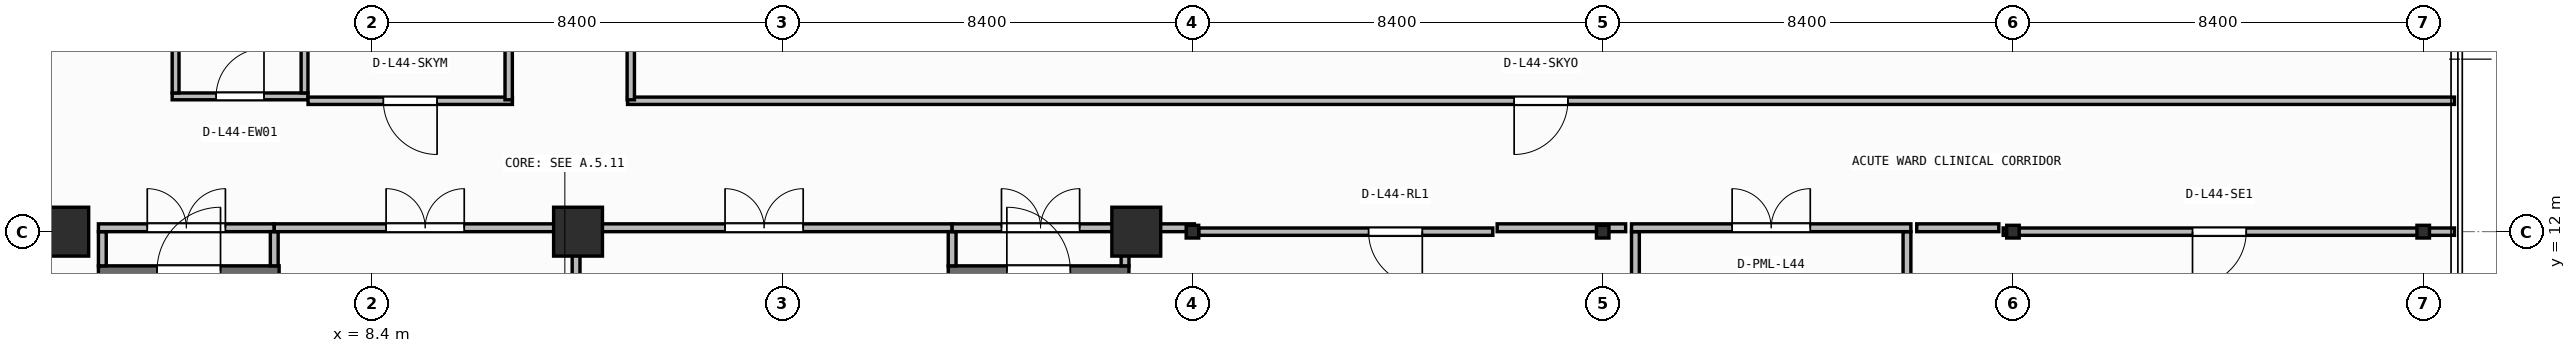
"""IFC4 building model, lengths in metres.
Left out: names, types, materials, properties, quantities, classifications, styles, units other than length and angle.
Written with IfcOpenShell. Run it as: python <this file> out.ifc"""

import sys

from ifc_helpers import new_model, si_unit, direction, frame, frame_2d, origin, origin_2d, place, context, subcontext, project, spatial, rectangle, i_section, extrude, element, fill, save


model = new_model("IFC4")
c1 = context("Model", 3, precision=1e-05, world=origin(), true_north=direction((0.0, 1.0)))
c2 = subcontext(c1, "Body", "Model", "MODEL_VIEW")
j1 = project(units=[si_unit("LENGTHUNIT", "METRE"), si_unit("PLANEANGLEUNIT", "RADIAN")], contexts=[c1])
p1 = place(None, origin())
s1 = spatial("IfcSite", under=j1, at=p1, CompositionType="ELEMENT")
p2 = place(p1, origin())
s2 = spatial("IfcBuilding", under=s1, at=p2, CompositionType="ELEMENT")
p3 = place(p2, frame((0.0, 0.0, 180.25)))
s3 = spatial("IfcBuildingStorey", under=s2, at=p3, CompositionType="ELEMENT", Elevation=180.25)
for number, where, z_axis, x_axis in (
    (1, (2.1, 12.0, 0.0), (0.0, 0.0, 1.0), (1.0, 0.0, 0.0)),
    (2, (12.62, 12.0, 0.0), (0.0, 0.0, 1.0), (1.0, 0.0, 0.0)),
    (3, (24.05, 12.0, 0.0), (0.0, 0.0, 1.0), (1.0, 0.0, 0.0)),
):
    element("IfcColumn", number, at=place(p3, frame(where, z_axis=z_axis, x_axis=x_axis)), inside=s3, PredefinedType="COLUMN", context=c2, shape_type="SweptSolid", body=[
        extrude(rectangle(XDim=1.0, YDim=1.0, at=origin_2d()), origin(), (0.0, 0.0, 1.0), 3.95),
    ])
for number, where, z_axis, x_axis in (
    (4, (25.2, 12.0, 0.0), (0.0, 0.0, 1.0), (1.0, 0.0, 0.0)),
    (5, (33.6, 12.0, 0.0), (0.0, 0.0, 1.0), (1.0, 0.0, 0.0)),
    (6, (42.0, 12.0, 0.0), (0.0, 0.0, 1.0), (1.0, 0.0, 0.0)),
    (7, (50.4, 12.0, 0.0), (0.0, 0.0, 1.0), (1.0, 0.0, 0.0)),
):
    element("IfcColumn", number, at=place(p3, frame(where, z_axis=z_axis, x_axis=x_axis)), inside=s3, PredefinedType="COLUMN", context=c2, shape_type="SweptSolid", body=[
        extrude(i_section(OverallWidth=0.256, OverallDepth=0.26, WebThickness=0.01, FlangeThickness=0.017, FilletRadius=0.013, at=origin_2d()), origin(), (0.0, 0.0, 1.0), 3.95),
    ])
p4 = place(p3, frame((2.8, 11.2, 0.0), z_axis=(0.0, 0.0, 1.0), x_axis=(1.0, 0.0, 0.0)))
e8 = element("IfcWall", 8, at=p4, inside=s3, PredefinedType="SHEAR", context=c2, shape_type="SweptSolid", body=[
    extrude(rectangle(XDim=3.7, YDim=0.2, at=frame_2d((1.85, 0.0))), origin(), (0.0, 0.0, 1.0), 3.71),
])
p5 = place(p4, frame((1.2, 0.0, 0.0)))
e9 = element("IfcOpeningElement", 9, at=p5, cuts=e8, PredefinedType="OPENING", context=c2, shape_type="SweptSolid", body=[
    extrude(rectangle(XDim=1.3, YDim=2.15, at=frame_2d((0.65, 1.075))), frame((0.0, 0.11, 0.0), z_axis=(0.0, -1.0, 0.0), x_axis=(1.0, 0.0, 0.0)), (0.0, 0.0, 1.0), 0.22),
])
p6 = place(p3, frame((20.2, 11.2, 0.0), z_axis=(0.0, 0.0, 1.0), x_axis=(1.0, 0.0, 0.0)))
e10 = element("IfcWall", 10, at=p6, inside=s3, PredefinedType="SHEAR", context=c2, shape_type="SweptSolid", body=[
    extrude(rectangle(XDim=3.7, YDim=0.2, at=frame_2d((1.85, 0.0))), origin(), (0.0, 0.0, 1.0), 3.71),
])
p7 = place(p6, frame((1.2, 0.0, 0.0)))
e11 = element("IfcOpeningElement", 11, at=p7, cuts=e10, PredefinedType="OPENING", context=c2, shape_type="SweptSolid", body=[
    extrude(rectangle(XDim=1.3, YDim=2.15, at=frame_2d((0.65, 1.075))), frame((0.0, 0.11, 0.0), z_axis=(0.0, -1.0, 0.0), x_axis=(1.0, 0.0, 0.0)), (0.0, 0.0, 1.0), 0.22),
])
p8 = place(p3, frame((2.88, 11.3, 0.0), z_axis=(0.0, 0.0, 1.0), x_axis=(0.0, 1.0, 0.0)))
e12 = element("IfcWall", 12, at=p8, inside=s3, PredefinedType="PARTITIONING", context=c2, shape_type="SweptSolid", body=[
    extrude(rectangle(XDim=0.7, YDim=0.16, at=frame_2d((0.35, 0.0))), origin(), (0.0, 0.0, 1.0), 3.71),
])
p9 = place(p3, frame((2.8, 12.08, 0.0), z_axis=(0.0, 0.0, 1.0), x_axis=(1.0, 0.0, 0.0)))
e13 = element("IfcWall", 13, at=p9, inside=s3, PredefinedType="PARTITIONING", context=c2, shape_type="SweptSolid", body=[
    extrude(rectangle(XDim=3.6, YDim=0.16, at=frame_2d((1.8, 0.0))), origin(), (0.0, 0.0, 1.0), 3.152),
])
p10 = place(p9, frame((1.0, 0.0, 0.0)))
e14 = element("IfcOpeningElement", 14, at=p10, cuts=e13, PredefinedType="OPENING", context=c2, shape_type="SweptSolid", body=[
    extrude(rectangle(XDim=1.6, YDim=2.05, at=frame_2d((0.8, 1.025))), frame((0.0, 0.09, 0.0), z_axis=(0.0, -1.0, 0.0), x_axis=(1.0, 0.0, 0.0)), (0.0, 0.0, 1.0), 0.18),
])
p11 = place(p3, frame((6.4, 11.3, 0.0), z_axis=(0.0, 0.0, 1.0), x_axis=(0.0, 1.0, 0.0)))
e15 = element("IfcWall", 15, at=p11, inside=s3, PredefinedType="PARTITIONING", context=c2, shape_type="SweptSolid", body=[
    extrude(rectangle(XDim=0.7, YDim=0.16, at=frame_2d((0.35, 0.0))), origin(), (0.0, 0.0, 1.0), 3.71),
])
p12 = place(p3, frame((6.4, 12.08, 0.0), z_axis=(0.0, 0.0, 1.0), x_axis=(1.0, 0.0, 0.0)))
e16 = element("IfcWall", 16, at=p12, inside=s3, PredefinedType="PARTITIONING", context=c2, shape_type="SweptSolid", body=[
    extrude(rectangle(XDim=6.18, YDim=0.16, at=frame_2d((3.09, 0.0))), origin(), (0.0, 0.0, 1.0), 3.152),
])
p13 = place(p12, frame((2.29, 0.0, 0.0)))
e17 = element("IfcOpeningElement", 17, at=p13, cuts=e16, PredefinedType="OPENING", context=c2, shape_type="SweptSolid", body=[
    extrude(rectangle(XDim=1.6, YDim=2.05, at=frame_2d((0.8, 1.025))), frame((0.0, 0.09, 0.0), z_axis=(0.0, -1.0, 0.0), x_axis=(1.0, 0.0, 0.0)), (0.0, 0.0, 1.0), 0.18),
])
p14 = place(p3, frame((12.58, 9.21, 0.0), z_axis=(0.0, 0.0, 1.0), x_axis=(0.0, 1.0, 0.0)))
e18 = element("IfcWall", 18, at=p14, inside=s3, PredefinedType="PARTITIONING", context=c2, shape_type="SweptSolid", body=[
    extrude(rectangle(XDim=2.79, YDim=0.16, at=frame_2d((1.395, 0.0))), origin(), (0.0, 0.0, 1.0), 3.71),
])
p15 = place(p3, frame((12.58, 12.08, 0.0), z_axis=(0.0, 0.0, 1.0), x_axis=(1.0, 0.0, 0.0)))
e19 = element("IfcWall", 19, at=p15, inside=s3, PredefinedType="PARTITIONING", context=c2, shape_type="SweptSolid", body=[
    extrude(rectangle(XDim=7.7, YDim=0.16, at=frame_2d((3.85, 0.0))), origin(), (0.0, 0.0, 1.0), 3.152),
])
p16 = place(p15, frame((3.05, 0.0, 0.0)))
e20 = element("IfcOpeningElement", 20, at=p16, cuts=e19, PredefinedType="OPENING", context=c2, shape_type="SweptSolid", body=[
    extrude(rectangle(XDim=1.6, YDim=2.05, at=frame_2d((0.8, 1.025))), frame((0.0, 0.09, 0.0), z_axis=(0.0, -1.0, 0.0), x_axis=(1.0, 0.0, 0.0)), (0.0, 0.0, 1.0), 0.18),
])
p17 = place(p3, frame((20.28, 11.3, 0.0), z_axis=(0.0, 0.0, 1.0), x_axis=(0.0, 1.0, 0.0)))
e21 = element("IfcWall", 21, at=p17, inside=s3, PredefinedType="PARTITIONING", context=c2, shape_type="SweptSolid", body=[
    extrude(rectangle(XDim=0.7, YDim=0.16, at=frame_2d((0.35, 0.0))), origin(), (0.0, 0.0, 1.0), 3.71),
])
p18 = place(p3, frame((20.28, 12.08, 0.0), z_axis=(0.0, 0.0, 1.0), x_axis=(1.0, 0.0, 0.0)))
e22 = element("IfcWall", 22, at=p18, inside=s3, PredefinedType="PARTITIONING", context=c2, shape_type="SweptSolid", body=[
    extrude(rectangle(XDim=3.62, YDim=0.16, at=frame_2d((1.81, 0.0))), origin(), (0.0, 0.0, 1.0), 3.152),
])
p19 = place(p18, frame((1.01, 0.0, 0.0)))
e23 = element("IfcOpeningElement", 23, at=p19, cuts=e22, PredefinedType="OPENING", context=c2, shape_type="SweptSolid", body=[
    extrude(rectangle(XDim=1.6, YDim=2.05, at=frame_2d((0.8, 1.025))), frame((0.0, 0.09, 0.0), z_axis=(0.0, -1.0, 0.0), x_axis=(1.0, 0.0, 0.0)), (0.0, 0.0, 1.0), 0.18),
])
p20 = place(p3, frame((23.82, 11.3, 0.0), z_axis=(0.0, 0.0, 1.0), x_axis=(0.0, 1.0, 0.0)))
e24 = element("IfcWall", 24, at=p20, inside=s3, PredefinedType="PARTITIONING", context=c2, shape_type="SweptSolid", body=[
    extrude(rectangle(XDim=0.7, YDim=0.16, at=frame_2d((0.35, 0.0))), origin(), (0.0, 0.0, 1.0), 3.71),
])
for number, where, z_axis, x_axis in (
    (25, (34.27, 8.61, 0.0), (0.0, 0.0, 1.0), (0.0, 1.0, 0.0)),
    (26, (39.83, 8.61, 0.0), (0.0, 0.0, 1.0), (0.0, 1.0, 0.0)),
):
    element("IfcWall", number, at=place(p3, frame(where, z_axis=z_axis, x_axis=x_axis)), inside=s3, PredefinedType="PARTITIONING", context=c2, shape_type="SweptSolid", body=[
        extrude(rectangle(XDim=3.39, YDim=0.16, at=frame_2d((1.695, 0.0))), origin(), (0.0, 0.0, 1.0), 3.71),
    ])
p21 = place(p3, frame((34.19, 12.08, 0.0), z_axis=(0.0, 0.0, 1.0), x_axis=(1.0, 0.0, 0.0)))
e27 = element("IfcWall", 27, at=p21, inside=s3, PredefinedType="PARTITIONING", context=c2, shape_type="SweptSolid", body=[
    extrude(rectangle(XDim=5.72, YDim=0.16, at=frame_2d((2.86, 0.0))), origin(), (0.0, 0.0, 1.0), 3.152),
])
p22 = place(p21, frame((2.06, 0.0, 0.0)))
e28 = element("IfcOpeningElement", 28, at=p22, cuts=e27, PredefinedType="OPENING", context=c2, shape_type="SweptSolid", body=[
    extrude(rectangle(XDim=1.6, YDim=2.05, at=frame_2d((0.8, 1.025))), frame((0.0, 0.09, 0.0), z_axis=(0.0, -1.0, 0.0), x_axis=(1.0, 0.0, 0.0)), (0.0, 0.0, 1.0), 0.18),
])
p23 = place(p3, frame((4.31, 14.77, 0.0), z_axis=(0.0, 0.0, 1.0), x_axis=(1.0, 0.0, 0.0)))
e29 = element("IfcWall", 29, at=p23, inside=s3, PredefinedType="PARTITIONING", context=c2, shape_type="SweptSolid", body=[
    extrude(rectangle(XDim=2.78, YDim=0.14, at=frame_2d((1.39, 0.0))), origin(), (0.0, 0.0, 1.0), 3.71),
])
p24 = place(p23, frame((0.9, 0.0, 0.0)))
e30 = element("IfcOpeningElement", 30, at=p24, cuts=e29, PredefinedType="OPENING", context=c2, shape_type="SweptSolid", body=[
    extrude(rectangle(XDim=0.98, YDim=2.1, at=frame_2d((0.49, 1.05))), frame((0.0, 0.08, 0.0), z_axis=(0.0, -1.0, 0.0), x_axis=(1.0, 0.0, 0.0)), (0.0, 0.0, 1.0), 0.16),
])
for number, where, z_axis, x_axis in (
    (31, (4.38, 14.84, 0.0), (0.0, 0.0, 1.0), (0.0, 1.0, 0.0)),
    (32, (7.02, 14.84, 0.0), (0.0, 0.0, 1.0), (0.0, 1.0, 0.0)),
):
    element("IfcWall", number, at=place(p3, frame(where, z_axis=z_axis, x_axis=x_axis)), inside=s3, PredefinedType="PARTITIONING", context=c2, shape_type="SweptSolid", body=[
        extrude(rectangle(XDim=2.2, YDim=0.14, at=frame_2d((1.1, 0.0))), origin(), (0.0, 0.0, 1.0), 3.71),
    ])
p25 = place(p3, frame((31.35, 12.0, 0.0), z_axis=(0.0, 0.0, 1.0), x_axis=(-1.0, 0.0, 0.0)))
e33 = element("IfcWall", 33, at=p25, inside=s3, PredefinedType="PARTITIONING", context=c2, shape_type="SweptSolid", body=[
    extrude(rectangle(XDim=6.022, YDim=0.15, at=frame_2d((3.011, 0.0))), origin(), (0.0, 0.0, 1.0), 3.152),
])
p26 = place(p25, frame((1.444, 0.0, 0.0)))
e34 = element("IfcOpeningElement", 34, at=p26, cuts=e33, PredefinedType="OPENING", context=c2, shape_type="SweptSolid", body=[
    extrude(rectangle(XDim=1.1, YDim=2.1, at=frame_2d((0.55, 1.05))), frame((0.0, 0.085, 0.0), z_axis=(0.0, -1.0, 0.0), x_axis=(1.0, 0.0, 0.0)), (0.0, 0.0, 1.0), 0.17),
])
p27 = place(p3, frame((51.04, 12.0, 0.0), z_axis=(0.0, 0.0, 1.0), x_axis=(-1.0, 0.0, 0.0)))
e35 = element("IfcWall", 35, at=p27, inside=s3, PredefinedType="PARTITIONING", context=c2, shape_type="SweptSolid", body=[
    extrude(rectangle(XDim=9.24, YDim=0.15, at=frame_2d((4.62, 0.0))), origin(), (0.0, 0.0, 1.0), 3.152),
])
p28 = place(p27, frame((4.263, 0.0, 0.0)))
e36 = element("IfcOpeningElement", 36, at=p28, cuts=e35, PredefinedType="OPENING", context=c2, shape_type="SweptSolid", body=[
    extrude(rectangle(XDim=1.1, YDim=2.1, at=frame_2d((0.55, 1.05))), frame((0.0, 0.085, 0.0), z_axis=(0.0, -1.0, 0.0), x_axis=(1.0, 0.0, 0.0)), (0.0, 0.0, 1.0), 0.17),
])
p29 = place(p3, frame((11.276, 14.68, 0.0), z_axis=(0.0, 0.0, 1.0), x_axis=(-1.0, 0.0, 0.0)))
e37 = element("IfcWall", 37, at=p29, inside=s3, PredefinedType="PARTITIONING", context=c2, shape_type="SweptSolid", body=[
    extrude(rectangle(XDim=4.184, YDim=0.15, at=frame_2d((2.092, 0.0))), origin(), (0.0, 0.0, 1.0), 3.71),
])
p30 = place(p29, frame((1.542, 0.0, 0.0)))
e38 = element("IfcOpeningElement", 38, at=p30, cuts=e37, PredefinedType="OPENING", context=c2, shape_type="SweptSolid", body=[
    extrude(rectangle(XDim=1.1, YDim=2.1, at=frame_2d((0.55, 1.05))), frame((0.0, 0.085, 0.0), z_axis=(0.0, -1.0, 0.0), x_axis=(1.0, 0.0, 0.0)), (0.0, 0.0, 1.0), 0.17),
])
p31 = place(p3, frame((51.04, 14.68, 0.0), z_axis=(0.0, 0.0, 1.0), x_axis=(-1.0, 0.0, 0.0)))
e39 = element("IfcWall", 39, at=p31, inside=s3, PredefinedType="PARTITIONING", context=c2, shape_type="SweptSolid", body=[
    extrude(rectangle(XDim=37.406, YDim=0.15, at=frame_2d((18.703, 0.0))), origin(), (0.0, 0.0, 1.0), 3.71),
])
p32 = place(p31, frame((18.153, 0.0, 0.0)))
e40 = element("IfcOpeningElement", 40, at=p32, cuts=e39, PredefinedType="OPENING", context=c2, shape_type="SweptSolid", body=[
    extrude(rectangle(XDim=1.1, YDim=2.1, at=frame_2d((0.55, 1.05))), frame((0.0, 0.085, 0.0), z_axis=(0.0, -1.0, 0.0), x_axis=(1.0, 0.0, 0.0)), (0.0, 0.0, 1.0), 0.17),
])
p33 = place(p3, frame((11.2, 25.607, 0.0), z_axis=(0.0, 0.0, 1.0), x_axis=(0.0, -1.0, 0.0)))
e41 = element("IfcWall", 41, at=p33, inside=s3, PredefinedType="PARTITIONING", context=c2, shape_type="SweptSolid", body=[
    extrude(rectangle(XDim=10.907, YDim=0.15, at=frame_2d((5.454, 0.0))), origin(), (0.0, 0.0, 1.0), 3.71),
])
p34 = place(p3, frame((13.7, 14.7, 0.0), z_axis=(0.0, 0.0, 1.0), x_axis=(0.0, 1.0, 0.0)))
e42 = element("IfcWall", 42, at=p34, inside=s3, PredefinedType="PARTITIONING", context=c2, shape_type="SweptSolid", body=[
    extrude(rectangle(XDim=10.898, YDim=0.15, at=frame_2d((5.449, 0.0))), origin(), (0.0, 0.0, 1.0), 3.71),
])
p35 = place(p3, frame((24.02, 12.08, 0.0), z_axis=(0.0, 0.0, 1.0), x_axis=(1.0, 0.0, 0.0)))
e43 = element("IfcWall", 43, at=p35, inside=s3, PredefinedType="PARTITIONING", context=c2, shape_type="SweptSolid", body=[
    extrude(rectangle(XDim=1.219, YDim=0.16, at=frame_2d((0.609, 0.0))), origin(), (0.0, 0.0, 1.0), 3.152),
])
p36 = place(p3, frame((31.439, 12.08, 0.0), z_axis=(0.0, 0.0, 1.0), x_axis=(1.0, 0.0, 0.0)))
e44 = element("IfcWall", 44, at=p36, inside=s3, PredefinedType="PARTITIONING", context=c2, shape_type="SweptSolid", body=[
    extrude(rectangle(XDim=2.631, YDim=0.16, at=frame_2d((1.315, 0.0))), origin(), (0.0, 0.0, 1.0), 3.152),
])
p37 = place(p3, frame((40.03, 12.08, 0.0), z_axis=(0.0, 0.0, 1.0), x_axis=(1.0, 0.0, 0.0)))
e45 = element("IfcWall", 45, at=p37, inside=s3, PredefinedType="PARTITIONING", context=c2, shape_type="SweptSolid", body=[
    extrude(rectangle(XDim=1.681, YDim=0.16, at=frame_2d((0.84, 0.0))), origin(), (0.0, 0.0, 1.0), 3.152),
])
p38 = place(p5, origin())
e46 = element("IfcDoor", 46, at=p38, inside=s3, OperationType="SINGLE_SWING_RIGHT", PredefinedType="DOOR", context=c2, shape_type="SweptSolid", body=[
    extrude(rectangle(XDim=1.3, YDim=2.15, at=frame_2d((0.65, 1.075))), frame((0.0, 0.025, 0.0), z_axis=(0.0, -1.0, 0.0), x_axis=(1.0, 0.0, 0.0)), (0.0, 0.0, 1.0), 0.05),
])
fill(e9, e46)
p39 = place(p7, origin())
e47 = element("IfcDoor", 47, at=p39, inside=s3, OperationType="SINGLE_SWING_LEFT", PredefinedType="DOOR", context=c2, shape_type="SweptSolid", body=[
    extrude(rectangle(XDim=1.3, YDim=2.15, at=frame_2d((0.65, 1.075))), frame((0.0, 0.025, 0.0), z_axis=(0.0, -1.0, 0.0), x_axis=(1.0, 0.0, 0.0)), (0.0, 0.0, 1.0), 0.05),
])
fill(e11, e47)
p40 = place(p10, origin())
e48 = element("IfcDoor", 48, at=p40, inside=s3, OperationType="DOUBLE_DOOR_SINGLE_SWING", PredefinedType="DOOR", context=c2, shape_type="SweptSolid", body=[
    extrude(rectangle(XDim=1.6, YDim=2.05, at=frame_2d((0.8, 1.025))), frame((0.0, 0.025, 0.0), z_axis=(0.0, -1.0, 0.0), x_axis=(1.0, 0.0, 0.0)), (0.0, 0.0, 1.0), 0.05),
])
fill(e14, e48)
p41 = place(p13, origin())
e49 = element("IfcDoor", 49, at=p41, inside=s3, OperationType="DOUBLE_DOOR_SINGLE_SWING", PredefinedType="DOOR", context=c2, shape_type="SweptSolid", body=[
    extrude(rectangle(XDim=1.6, YDim=2.05, at=frame_2d((0.8, 1.025))), frame((0.0, 0.025, 0.0), z_axis=(0.0, -1.0, 0.0), x_axis=(1.0, 0.0, 0.0)), (0.0, 0.0, 1.0), 0.05),
])
fill(e17, e49)
p42 = place(p16, origin())
e50 = element("IfcDoor", 50, at=p42, inside=s3, OperationType="DOUBLE_DOOR_SINGLE_SWING", PredefinedType="DOOR", context=c2, shape_type="SweptSolid", body=[
    extrude(rectangle(XDim=1.6, YDim=2.05, at=frame_2d((0.8, 1.025))), frame((0.0, 0.025, 0.0), z_axis=(0.0, -1.0, 0.0), x_axis=(1.0, 0.0, 0.0)), (0.0, 0.0, 1.0), 0.05),
])
fill(e20, e50)
p43 = place(p19, origin())
e51 = element("IfcDoor", 51, at=p43, inside=s3, OperationType="DOUBLE_DOOR_SINGLE_SWING", PredefinedType="DOOR", context=c2, shape_type="SweptSolid", body=[
    extrude(rectangle(XDim=1.6, YDim=2.05, at=frame_2d((0.8, 1.025))), frame((0.0, 0.025, 0.0), z_axis=(0.0, -1.0, 0.0), x_axis=(1.0, 0.0, 0.0)), (0.0, 0.0, 1.0), 0.05),
])
fill(e23, e51)
p44 = place(p22, origin())
e52 = element("IfcDoor", 52, at=p44, inside=s3, OperationType="DOUBLE_DOOR_SINGLE_SWING", PredefinedType="DOOR", context=c2, shape_type="SweptSolid", body=[
    extrude(rectangle(XDim=1.6, YDim=2.05, at=frame_2d((0.8, 1.025))), frame((0.0, 0.025, 0.0), z_axis=(0.0, -1.0, 0.0), x_axis=(1.0, 0.0, 0.0)), (0.0, 0.0, 1.0), 0.05),
])
fill(e28, e52)
p45 = place(p24, origin())
e53 = element("IfcDoor", 53, at=p45, inside=s3, OperationType="SINGLE_SWING_RIGHT", PredefinedType="DOOR", context=c2, shape_type="SweptSolid", body=[
    extrude(rectangle(XDim=0.98, YDim=2.1, at=frame_2d((0.49, 1.05))), frame((0.0, 0.025, 0.0), z_axis=(0.0, -1.0, 0.0), x_axis=(1.0, 0.0, 0.0)), (0.0, 0.0, 1.0), 0.05),
])
fill(e30, e53)
p46 = place(p26, origin())
e54 = element("IfcDoor", 54, at=p46, inside=s3, OperationType="SINGLE_SWING_LEFT", PredefinedType="DOOR", context=c2, shape_type="SweptSolid", body=[
    extrude(rectangle(XDim=1.1, YDim=2.1, at=frame_2d((0.55, 1.05))), frame((0.0, 0.025, 0.0), z_axis=(0.0, -1.0, 0.0), x_axis=(1.0, 0.0, 0.0)), (0.0, 0.0, 1.0), 0.05),
])
fill(e34, e54)
p47 = place(p28, origin())
e55 = element("IfcDoor", 55, at=p47, inside=s3, OperationType="SINGLE_SWING_RIGHT", PredefinedType="DOOR", context=c2, shape_type="SweptSolid", body=[
    extrude(rectangle(XDim=1.1, YDim=2.1, at=frame_2d((0.55, 1.05))), frame((0.0, 0.025, 0.0), z_axis=(0.0, -1.0, 0.0), x_axis=(1.0, 0.0, 0.0)), (0.0, 0.0, 1.0), 0.05),
])
fill(e36, e55)
p48 = place(p30, origin())
e56 = element("IfcDoor", 56, at=p48, inside=s3, OperationType="SINGLE_SWING_LEFT", PredefinedType="DOOR", context=c2, shape_type="SweptSolid", body=[
    extrude(rectangle(XDim=1.1, YDim=2.1, at=frame_2d((0.55, 1.05))), frame((0.0, 0.025, 0.0), z_axis=(0.0, -1.0, 0.0), x_axis=(1.0, 0.0, 0.0)), (0.0, 0.0, 1.0), 0.05),
])
fill(e38, e56)
p49 = place(p32, origin())
e57 = element("IfcDoor", 57, at=p49, inside=s3, OperationType="SINGLE_SWING_RIGHT", PredefinedType="DOOR", context=c2, shape_type="SweptSolid", body=[
    extrude(rectangle(XDim=1.1, YDim=2.1, at=frame_2d((0.55, 1.05))), frame((0.0, 0.025, 0.0), z_axis=(0.0, -1.0, 0.0), x_axis=(1.0, 0.0, 0.0)), (0.0, 0.0, 1.0), 0.05),
])
fill(e40, e57)
save(model, sys.argv[1])
